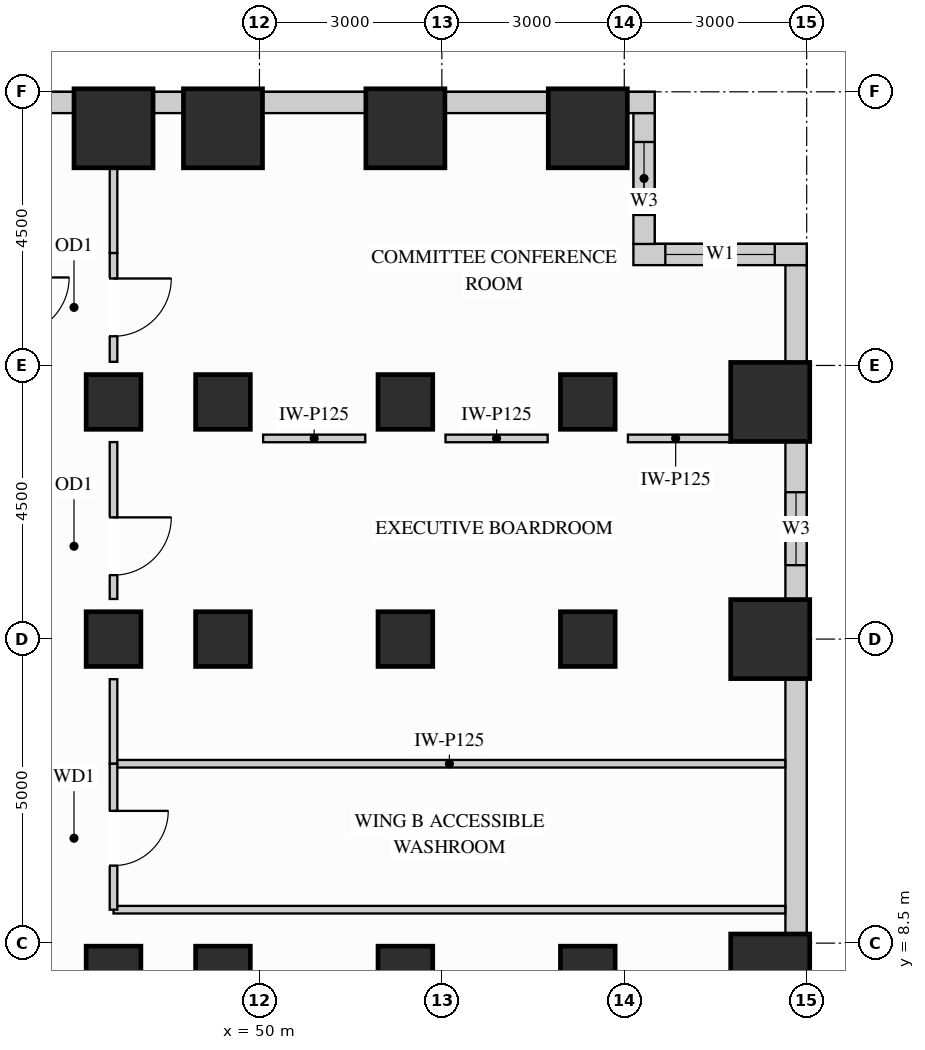
"""IFC4 building model, lengths in metres.
Left out: names, types, materials, properties, quantities, classifications, styles, units other than length and angle.
Written with IfcOpenShell. Run it as: python <this file> out.ifc"""

import sys

from ifc_helpers import new_model, si_unit, direction, frame, frame_2d, origin, origin_2d, place, context, subcontext, project, spatial, rectangle, extrude, source, transform, mapped, element, fill, save


model = new_model("IFC4")
c1 = context("Model", 3, precision=1e-05, world=origin(), true_north=direction((0.0, 1.0)))
c2 = subcontext(c1, "Body", "Model", "MODEL_VIEW")
j1 = project(units=[si_unit("LENGTHUNIT", "METRE"), si_unit("PLANEANGLEUNIT", "RADIAN")], contexts=[c1])
p1 = place(None, origin())
s1 = spatial("IfcSite", under=j1, at=p1, CompositionType="ELEMENT")
p2 = place(p1, origin())
s2 = spatial("IfcBuilding", under=s1, at=p2, CompositionType="ELEMENT")
p3 = place(p2, frame((0.0, 0.0, 69.3)))
s3 = spatial("IfcBuildingStorey", under=s2, at=p3, CompositionType="ELEMENT", Elevation=69.3)
m1 = source(origin(), c2, "Body", "SweptSolid", [
    extrude(rectangle(XDim=0.9, YDim=0.9, at=origin_2d()), origin(), (0.0, 0.0, 1.0), 3.32),
])
for number, where, z_axis, x_axis in (
    (1, (47.6, 13.5, 0.0), (0.0, 0.0, 1.0), (1.0, 0.0, 0.0)),
    (2, (47.6, 8.0, 0.0), (0.0, 0.0, 1.0), (1.0, 0.0, 0.0)),
    (3, (47.6, 17.4, 0.0), (0.0, 0.0, 1.0), (1.0, 0.0, 0.0)),
    (4, (49.4, 13.5, 0.0), (0.0, 0.0, 1.0), (1.0, 0.0, 0.0)),
    (5, (49.4, 17.4, 0.0), (0.0, 0.0, 1.0), (1.0, 0.0, 0.0)),
    (6, (49.4, 8.0, 0.0), (0.0, 0.0, 1.0), (1.0, 0.0, 0.0)),
    (7, (52.4, 13.5, 0.0), (0.0, 0.0, 1.0), (1.0, 0.0, 0.0)),
    (8, (52.4, 17.4, 0.0), (0.0, 0.0, 1.0), (1.0, 0.0, 0.0)),
    (9, (52.4, 8.0, 0.0), (0.0, 0.0, 1.0), (1.0, 0.0, 0.0)),
    (10, (55.4, 13.5, 0.0), (0.0, 0.0, 1.0), (1.0, 0.0, 0.0)),
    (11, (55.4, 17.4, 0.0), (0.0, 0.0, 1.0), (1.0, 0.0, 0.0)),
    (12, (55.4, 8.0, 0.0), (0.0, 0.0, 1.0), (1.0, 0.0, 0.0)),
):
    element("IfcColumn", number, at=place(p3, frame(where, z_axis=z_axis, x_axis=x_axis)), inside=s3, PredefinedType="COLUMN", context=c2, shape_type="MappedRepresentation", body=[
        mapped(m1, transform((0.0, 0.0, 0.0), x_axis=(1.0, 0.0, 0.0), y_axis=(0.0, 1.0, 0.0), z_axis=(0.0, 0.0, 1.0))),
    ])
m2 = source(origin(), c2, "Body", "SweptSolid", [
    extrude(rectangle(XDim=1.3, YDim=1.3, at=origin_2d()), origin(), (0.0, 0.0, 1.0), 3.32),
])
for number, where, z_axis, x_axis in (
    (13, (47.6, 21.9, 0.0), (0.0, 0.0, 1.0), (1.0, 0.0, 0.0)),
    (14, (49.4, 21.9, 0.0), (0.0, 0.0, 1.0), (1.0, 0.0, 0.0)),
    (15, (52.4, 21.9, 0.0), (0.0, 0.0, 1.0), (1.0, 0.0, 0.0)),
    (16, (55.4, 21.9, 0.0), (0.0, 0.0, 1.0), (1.0, 0.0, 0.0)),
    (17, (58.4, 13.5, 0.0), (0.0, 0.0, 1.0), (1.0, 0.0, 0.0)),
    (18, (58.4, 17.4, 0.0), (0.0, 0.0, 1.0), (1.0, 0.0, 0.0)),
    (19, (58.4, 8.0, 0.0), (0.0, 0.0, 1.0), (1.0, 0.0, 0.0)),
):
    element("IfcColumn", number, at=place(p3, frame(where, z_axis=z_axis, x_axis=x_axis)), inside=s3, PredefinedType="COLUMN", context=c2, shape_type="MappedRepresentation", body=[
        mapped(m2, transform((0.0, 0.0, 0.0), x_axis=(1.0, 0.0, 0.0), y_axis=(0.0, 1.0, 0.0), z_axis=(0.0, 0.0, 1.0))),
    ])
m3 = source(origin(), c2, "Body", "SweptSolid", [
    extrude(rectangle(XDim=4.204, YDim=0.35, at=frame_2d((2.102, 0.0))), origin(), (0.0, 0.0, 1.0), 2.45),
])
p4 = place(p3, frame((58.825, 8.648, 0.0), z_axis=(0.0, 0.0, 1.0), x_axis=(0.0, 1.0, 0.0)))
e20 = element("IfcWall", 20, at=p4, inside=s3, PredefinedType="SOLIDWALL", context=c2, shape_type="MappedRepresentation", body=[
    mapped(m3, transform((0.0, 0.0, 0.0), x_axis=(1.0, 0.0, 0.0), y_axis=(0.0, 1.0, 0.0), z_axis=(0.0, 0.0, 1.0))),
])
p5 = place(p3, frame((58.825, 14.148, 0.0), z_axis=(0.0, 0.0, 1.0), x_axis=(0.0, 1.0, 0.0)))
e21 = element("IfcWall", 21, at=p5, inside=s3, PredefinedType="SOLIDWALL", context=c2, shape_type="SweptSolid", body=[
    extrude(rectangle(XDim=2.604, YDim=0.35, at=frame_2d((1.302, 0.0))), origin(), (0.0, 0.0, 1.0), 2.45),
])
p6 = place(p5, frame((0.567, 0.0, 0.78)))
e22 = element("IfcOpeningElement", 22, at=p6, cuts=e21, PredefinedType="OPENING", context=c2, shape_type="SweptSolid", body=[
    extrude(rectangle(XDim=1.2, YDim=1.49, at=frame_2d((0.6, 0.745))), frame((0.0, 0.185, 0.0), z_axis=(0.0, -1.0, 0.0), x_axis=(1.0, 0.0, 0.0)), (0.0, 0.0, 1.0), 0.37),
])
m4 = source(origin(), c2, "Body", "SweptSolid", [
    extrude(rectangle(XDim=1.604, YDim=0.35, at=frame_2d((0.802, 0.0))), origin(), (0.0, 0.0, 1.0), 3.305),
])
p7 = place(p3, frame((58.825, 18.048, 0.0), z_axis=(0.0, 0.0, 1.0), x_axis=(0.0, 1.0, 0.0)))
e23 = element("IfcWall", 23, at=p7, inside=s3, PredefinedType="SOLIDWALL", context=c2, shape_type="MappedRepresentation", body=[
    mapped(m4, transform((0.0, 0.0, 0.0), x_axis=(1.0, 0.0, 0.0), y_axis=(0.0, 1.0, 0.0), z_axis=(0.0, 0.0, 1.0))),
])
p8 = place(p3, frame((59.0, 19.825, 0.0), z_axis=(0.0, 0.0, 1.0), x_axis=(-1.0, 0.0, 0.0)))
e24 = element("IfcWall", 24, at=p8, inside=s3, PredefinedType="SOLIDWALL", context=c2, shape_type="SweptSolid", body=[
    extrude(rectangle(XDim=2.85, YDim=0.35, at=frame_2d((1.425, 0.0))), origin(), (0.0, 0.0, 1.0), 3.305),
])
p9 = place(p8, frame((0.525, 0.0, 0.78)))
e25 = element("IfcOpeningElement", 25, at=p9, cuts=e24, PredefinedType="OPENING", context=c2, shape_type="SweptSolid", body=[
    extrude(rectangle(XDim=1.8, YDim=2.1, at=frame_2d((0.9, 1.05))), frame((0.0, 0.185, 0.0), z_axis=(0.0, -1.0, 0.0), x_axis=(1.0, 0.0, 0.0)), (0.0, 0.0, 1.0), 0.37),
])
p10 = place(p3, frame((56.325, 19.998, 0.0), z_axis=(0.0, 0.0, 1.0), x_axis=(0.0, 1.0, 0.0)))
e26 = element("IfcWall", 26, at=p10, inside=s3, PredefinedType="SOLIDWALL", context=c2, shape_type="SweptSolid", body=[
    extrude(rectangle(XDim=2.154, YDim=0.35, at=frame_2d((1.077, 0.0))), origin(), (0.0, 0.0, 1.0), 3.305),
])
p11 = place(p10, frame((0.477, 0.0, 0.78)))
e27 = element("IfcOpeningElement", 27, at=p11, cuts=e26, PredefinedType="OPENING", context=c2, shape_type="SweptSolid", body=[
    extrude(rectangle(XDim=1.2, YDim=2.1, at=frame_2d((0.6, 1.05))), frame((0.0, 0.185, 0.0), z_axis=(0.0, -1.0, 0.0), x_axis=(1.0, 0.0, 0.0)), (0.0, 0.0, 1.0), 0.37),
])
m5 = source(origin(), c2, "Body", "SweptSolid", [
    extrude(rectangle(XDim=0.452, YDim=0.35, at=frame_2d((0.226, 0.0))), origin(), (0.0, 0.0, 1.0), 3.305),
])
p12 = place(p3, frame((56.5, 22.325, 0.0), z_axis=(0.0, 0.0, 1.0), x_axis=(-1.0, 0.0, 0.0)))
e28 = element("IfcWall", 28, at=p12, inside=s3, PredefinedType="SOLIDWALL", context=c2, shape_type="MappedRepresentation", body=[
    mapped(m5, transform((0.0, 0.0, 0.0), x_axis=(1.0, 0.0, 0.0), y_axis=(0.0, 1.0, 0.0), z_axis=(0.0, 0.0, 1.0))),
])
m6 = source(origin(), c2, "Body", "SweptSolid", [
    extrude(rectangle(XDim=1.704, YDim=0.35, at=frame_2d((0.852, 0.0))), origin(), (0.0, 0.0, 1.0), 2.45),
])
for number, where, z_axis, x_axis in (
    (29, (54.752, 22.325, 0.0), (0.0, 0.0, 1.0), (-1.0, 0.0, 0.0)),
    (30, (51.752, 22.325, 0.0), (0.0, 0.0, 1.0), (-1.0, 0.0, 0.0)),
):
    element("IfcWall", number, at=place(p3, frame(where, z_axis=z_axis, x_axis=x_axis)), inside=s3, PredefinedType="SOLIDWALL", context=c2, shape_type="MappedRepresentation", body=[
        mapped(m6, transform((0.0, 0.0, 0.0), x_axis=(1.0, 0.0, 0.0), y_axis=(0.0, 1.0, 0.0), z_axis=(0.0, 0.0, 1.0))),
    ])
m7 = source(origin(), c2, "Body", "SweptSolid", [
    extrude(rectangle(XDim=0.504, YDim=0.35, at=frame_2d((0.252, 0.0))), origin(), (0.0, 0.0, 1.0), 3.305),
])
p13 = place(p3, frame((48.752, 22.325, 0.0), z_axis=(0.0, 0.0, 1.0), x_axis=(-1.0, 0.0, 0.0)))
e31 = element("IfcWall", 31, at=p13, inside=s3, PredefinedType="SOLIDWALL", context=c2, shape_type="MappedRepresentation", body=[
    mapped(m7, transform((0.0, 0.0, 0.0), x_axis=(1.0, 0.0, 0.0), y_axis=(0.0, 1.0, 0.0), z_axis=(0.0, 0.0, 1.0))),
])
p14 = place(p3, frame((46.952, 22.325, 0.0), z_axis=(0.0, 0.0, 1.0), x_axis=(-1.0, 0.0, 0.0)))
e32 = element("IfcWall", 32, at=p14, inside=s3, PredefinedType="SOLIDWALL", context=c2, shape_type="SweptSolid", body=[
    extrude(rectangle(XDim=6.304, YDim=0.35, at=frame_2d((3.152, 0.0))), origin(), (0.0, 0.0, 1.0), 2.45),
])
p15 = place(p14, frame((1.649, 0.0, 0.78)))
e33 = element("IfcOpeningElement", 33, at=p15, cuts=e32, PredefinedType="OPENING", context=c2, shape_type="SweptSolid", body=[
    extrude(rectangle(XDim=1.8, YDim=1.49, at=frame_2d((0.9, 0.745))), frame((0.0, 0.185, 0.0), z_axis=(0.0, -1.0, 0.0), x_axis=(1.0, 0.0, 0.0)), (0.0, 0.0, 1.0), 0.37),
])
p16 = place(p14, frame((3.817, 0.0, 0.78)))
e34 = element("IfcOpeningElement", 34, at=p16, cuts=e32, PredefinedType="OPENING", context=c2, shape_type="SweptSolid", body=[
    extrude(rectangle(XDim=1.8, YDim=1.49, at=frame_2d((0.9, 0.745))), frame((0.0, 0.185, 0.0), z_axis=(0.0, -1.0, 0.0), x_axis=(1.0, 0.0, 0.0)), (0.0, 0.0, 1.0), 0.37),
])
m8 = source(origin(), c2, "Body", "SweptSolid", [
    extrude(rectangle(XDim=11.048, YDim=0.125, at=frame_2d((5.524, 0.0))), origin(), (0.0, 0.0, 1.0), 3.305),
])
p17 = place(p3, frame((47.6, 11.45, 0.0), z_axis=(0.0, 0.0, 1.0), x_axis=(1.0, 0.0, 0.0)))
e35 = element("IfcWall", 35, at=p17, inside=s3, PredefinedType="PARTITIONING", context=c2, shape_type="MappedRepresentation", body=[
    mapped(m8, transform((0.0, 0.0, 0.0), x_axis=(1.0, 0.0, 0.0), y_axis=(0.0, 1.0, 0.0), z_axis=(0.0, 0.0, 1.0))),
])
m9 = source(origin(), c2, "Body", "SweptSolid", [
    extrude(rectangle(XDim=1.68, YDim=0.125, at=frame_2d((0.84, 0.0))), origin(), (0.0, 0.0, 1.0), 2.61),
])
for number, where, z_axis, x_axis in (
    (36, (50.06, 16.8, 0.0), (0.0, 0.0, 1.0), (1.0, 0.0, 0.0)),
    (37, (53.06, 16.8, 0.0), (0.0, 0.0, 1.0), (1.0, 0.0, 0.0)),
    (38, (56.06, 16.8, 0.0), (0.0, 0.0, 1.0), (1.0, 0.0, 0.0)),
):
    element("IfcWall", number, at=place(p3, frame(where, z_axis=z_axis, x_axis=x_axis)), inside=s3, PredefinedType="PARTITIONING", context=c2, shape_type="MappedRepresentation", body=[
        mapped(m9, transform((0.0, 0.0, 0.0), x_axis=(1.0, 0.0, 0.0), y_axis=(0.0, 1.0, 0.0), z_axis=(0.0, 0.0, 1.0))),
    ])
p18 = place(p3, frame((47.6, 9.05, 0.0), z_axis=(0.0, 0.0, 1.0), x_axis=(1.0, 0.0, 0.0)))
e39 = element("IfcWall", 39, at=p18, inside=s3, PredefinedType="PARTITIONING", context=c2, shape_type="MappedRepresentation", body=[
    mapped(m8, transform((0.0, 0.0, 0.0), x_axis=(1.0, 0.0, 0.0), y_axis=(0.0, 1.0, 0.0), z_axis=(0.0, 0.0, 1.0))),
])
m10 = source(origin(), c2, "Body", "SweptSolid", [
    extrude(rectangle(XDim=1.39, YDim=0.125, at=frame_2d((0.695, 0.0))), origin(), (0.0, 0.0, 1.0), 2.61),
])
p19 = place(p3, frame((47.6, 11.45, 0.0), z_axis=(0.0, 0.0, 1.0), x_axis=(0.0, 1.0, 0.0)))
e40 = element("IfcWall", 40, at=p19, inside=s3, PredefinedType="PARTITIONING", context=c2, shape_type="MappedRepresentation", body=[
    mapped(m10, transform((0.0, 0.0, 0.0), x_axis=(1.0, 0.0, 0.0), y_axis=(0.0, 1.0, 0.0), z_axis=(0.0, 0.0, 1.0))),
])
p20 = place(p3, frame((47.6, 14.16, 0.0), z_axis=(0.0, 0.0, 1.0), x_axis=(0.0, 1.0, 0.0)))
e41 = element("IfcWall", 41, at=p20, inside=s3, PredefinedType="PARTITIONING", context=c2, shape_type="SweptSolid", body=[
    extrude(rectangle(XDim=2.58, YDim=0.125, at=frame_2d((1.29, 0.0))), origin(), (0.0, 0.0, 1.0), 2.61),
])
p21 = place(p20, frame((0.392, 0.0, 0.0)))
e42 = element("IfcOpeningElement", 42, at=p21, cuts=e41, PredefinedType="OPENING", context=c2, shape_type="SweptSolid", body=[
    extrude(rectangle(XDim=0.95, YDim=2.15, at=frame_2d((0.475, 1.075))), frame((0.0, 0.073, 0.0), z_axis=(0.0, -1.0, 0.0), x_axis=(1.0, 0.0, 0.0)), (0.0, 0.0, 1.0), 0.145),
])
p22 = place(p3, frame((47.6, 18.06, 0.0), z_axis=(0.0, 0.0, 1.0), x_axis=(0.0, 1.0, 0.0)))
e43 = element("IfcWall", 43, at=p22, inside=s3, PredefinedType="PARTITIONING", context=c2, shape_type="SweptSolid", body=[
    extrude(rectangle(XDim=1.79, YDim=0.125, at=frame_2d((0.895, 0.0))), origin(), (0.0, 0.0, 1.0), 2.61),
])
p23 = place(p22, frame((0.42, 0.0, 0.0)))
e44 = element("IfcOpeningElement", 44, at=p23, cuts=e43, PredefinedType="OPENING", context=c2, shape_type="SweptSolid", body=[
    extrude(rectangle(XDim=0.95, YDim=2.15, at=frame_2d((0.475, 1.075))), frame((0.0, 0.073, 0.0), z_axis=(0.0, -1.0, 0.0), x_axis=(1.0, 0.0, 0.0)), (0.0, 0.0, 1.0), 0.145),
])
m11 = source(origin(), c2, "Body", "SweptSolid", [
    extrude(rectangle(XDim=1.39, YDim=0.125, at=frame_2d((0.695, 0.0))), origin(), (0.0, 0.0, 1.0), 2.61),
])
p24 = place(p3, frame((47.6, 19.85, 0.0), z_axis=(0.0, 0.0, 1.0), x_axis=(0.0, 1.0, 0.0)))
e45 = element("IfcWall", 45, at=p24, inside=s3, PredefinedType="PARTITIONING", context=c2, shape_type="MappedRepresentation", body=[
    mapped(m11, transform((0.0, 0.0, 0.0), x_axis=(1.0, 0.0, 0.0), y_axis=(0.0, 1.0, 0.0), z_axis=(0.0, 0.0, 1.0))),
])
p25 = place(p3, frame((47.6, 9.05, 0.0), z_axis=(0.0, 0.0, 1.0), x_axis=(0.0, 1.0, 0.0)))
e46 = element("IfcWall", 46, at=p25, inside=s3, PredefinedType="PARTITIONING", context=c2, shape_type="SweptSolid", body=[
    extrude(rectangle(XDim=2.4, YDim=0.125, at=frame_2d((1.2, 0.0))), origin(), (0.0, 0.0, 1.0), 2.61),
])
p26 = place(p25, frame((0.725, 0.0, 0.0)))
e47 = element("IfcOpeningElement", 47, at=p26, cuts=e46, PredefinedType="OPENING", context=c2, shape_type="SweptSolid", body=[
    extrude(rectangle(XDim=0.9, YDim=2.15, at=frame_2d((0.45, 1.075))), frame((0.0, 0.073, 0.0), z_axis=(0.0, -1.0, 0.0), x_axis=(1.0, 0.0, 0.0)), (0.0, 0.0, 1.0), 0.145),
])
m12 = source(origin(), c2, "Body", "SweptSolid", [
    extrude(rectangle(XDim=0.95, YDim=2.15, at=frame_2d((0.475, 1.075))), frame((0.0, 0.025, 0.0), z_axis=(0.0, -1.0, 0.0), x_axis=(1.0, 0.0, 0.0)), (0.0, 0.0, 1.0), 0.05),
])
p27 = place(p21, origin())
e48 = element("IfcDoor", 48, at=p27, inside=s3, OperationType="SINGLE_SWING_RIGHT", PredefinedType="DOOR", context=c2, shape_type="MappedRepresentation", body=[
    mapped(m12, transform((0.0, 0.0, 0.0), x_axis=(1.0, 0.0, 0.0), y_axis=(0.0, 1.0, 0.0), z_axis=(0.0, 0.0, 1.0))),
])
fill(e42, e48)
p28 = place(p23, origin())
e49 = element("IfcDoor", 49, at=p28, inside=s3, OperationType="SINGLE_SWING_RIGHT", PredefinedType="DOOR", context=c2, shape_type="MappedRepresentation", body=[
    mapped(m12, transform((0.0, 0.0, 0.0), x_axis=(1.0, 0.0, 0.0), y_axis=(0.0, 1.0, 0.0), z_axis=(0.0, 0.0, 1.0))),
])
fill(e44, e49)
m13 = source(origin(), c2, "Body", "SweptSolid", [
    extrude(rectangle(XDim=0.9, YDim=2.15, at=frame_2d((0.45, 1.075))), frame((0.0, 0.025, 0.0), z_axis=(0.0, -1.0, 0.0), x_axis=(1.0, 0.0, 0.0)), (0.0, 0.0, 1.0), 0.05),
])
p29 = place(p26, origin())
e50 = element("IfcDoor", 50, at=p29, inside=s3, OperationType="SINGLE_SWING_RIGHT", PredefinedType="DOOR", context=c2, shape_type="MappedRepresentation", body=[
    mapped(m13, transform((0.0, 0.0, 0.0), x_axis=(1.0, 0.0, 0.0), y_axis=(0.0, 1.0, 0.0), z_axis=(0.0, 0.0, 1.0))),
])
fill(e47, e50)
m14 = source(origin(), c2, "Body", "SweptSolid", [
    extrude(rectangle(XDim=1.8, YDim=2.1, at=frame_2d((0.9, 1.05))), frame((0.0, 0.03, 0.0), z_axis=(0.0, -1.0, 0.0), x_axis=(1.0, 0.0, 0.0)), (0.0, 0.0, 1.0), 0.06),
])
p30 = place(p9, origin())
e51 = element("IfcWindow", 51, at=p30, inside=s3, PartitioningType="SINGLE_PANEL", PredefinedType="WINDOW", context=c2, shape_type="MappedRepresentation", body=[
    mapped(m14, transform((0.0, 0.0, 0.0), x_axis=(1.0, 0.0, 0.0), y_axis=(0.0, 1.0, 0.0), z_axis=(0.0, 0.0, 1.0))),
])
fill(e25, e51)
m15 = source(origin(), c2, "Body", "SweptSolid", [
    extrude(rectangle(XDim=1.2, YDim=1.49, at=frame_2d((0.6, 0.745))), frame((0.0, 0.03, 0.0), z_axis=(0.0, -1.0, 0.0), x_axis=(1.0, 0.0, 0.0)), (0.0, 0.0, 1.0), 0.06),
])
p31 = place(p6, origin())
e52 = element("IfcWindow", 52, at=p31, inside=s3, PartitioningType="SINGLE_PANEL", PredefinedType="WINDOW", context=c2, shape_type="MappedRepresentation", body=[
    mapped(m15, transform((0.0, 0.0, 0.0), x_axis=(1.0, 0.0, 0.0), y_axis=(0.0, 1.0, 0.0), z_axis=(0.0, 0.0, 1.0))),
])
fill(e22, e52)
m16 = source(origin(), c2, "Body", "SweptSolid", [
    extrude(rectangle(XDim=1.2, YDim=2.1, at=frame_2d((0.6, 1.05))), frame((0.0, 0.03, 0.0), z_axis=(0.0, -1.0, 0.0), x_axis=(1.0, 0.0, 0.0)), (0.0, 0.0, 1.0), 0.06),
])
p32 = place(p11, origin())
e53 = element("IfcWindow", 53, at=p32, inside=s3, PartitioningType="SINGLE_PANEL", PredefinedType="WINDOW", context=c2, shape_type="MappedRepresentation", body=[
    mapped(m16, transform((0.0, 0.0, 0.0), x_axis=(1.0, 0.0, 0.0), y_axis=(0.0, 1.0, 0.0), z_axis=(0.0, 0.0, 1.0))),
])
fill(e27, e53)
save(model, sys.argv[1])
